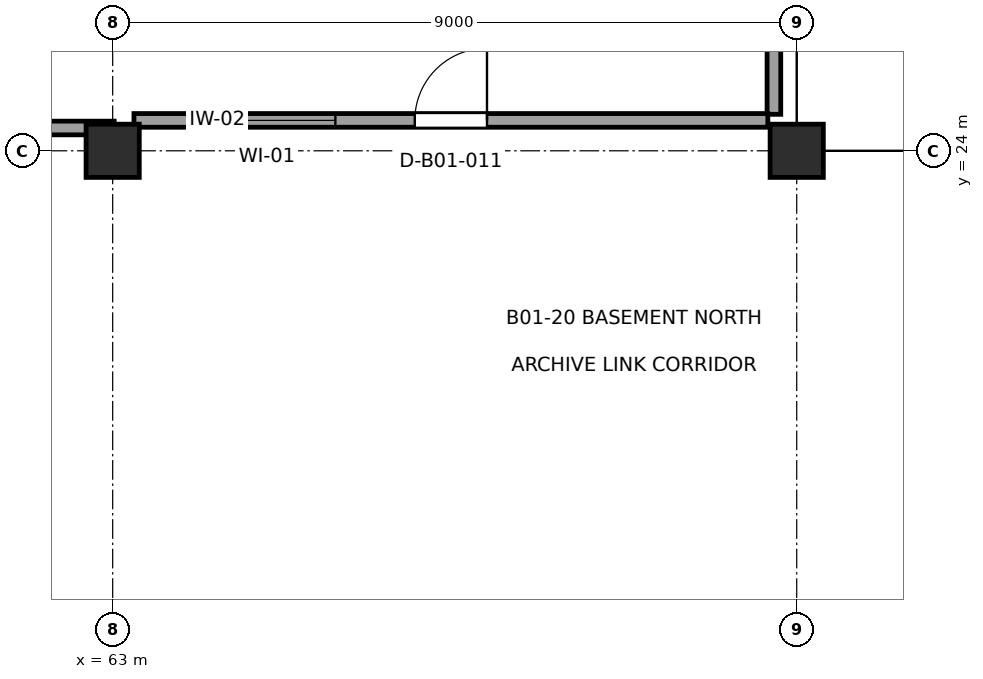
"""IFC4 building model, lengths in metres.
Left out: names, types, materials, properties, quantities, classifications, styles, units other than length and angle.
Written with IfcOpenShell. Run it as: python <this file> out.ifc"""

import sys

from ifc_helpers import new_model, si_unit, direction, frame, frame_2d, origin, origin_2d, place, context, subcontext, project, spatial, rectangle, extrude, element, fill, save


model = new_model("IFC4")
c1 = context("Model", 3, precision=1e-05, world=origin(), true_north=direction((0.0, 1.0)))
c2 = subcontext(c1, "Body", "Model", "MODEL_VIEW")
j1 = project(units=[si_unit("LENGTHUNIT", "METRE"), si_unit("PLANEANGLEUNIT", "RADIAN")], contexts=[c1])
p1 = place(None, origin())
s1 = spatial("IfcSite", under=j1, at=p1, CompositionType="ELEMENT")
p2 = place(p1, origin())
s2 = spatial("IfcBuilding", under=s1, at=p2, CompositionType="ELEMENT")
p3 = place(p2, frame((0.0, 0.0, -4.5)))
s3 = spatial("IfcBuildingStorey", under=s2, at=p3, CompositionType="ELEMENT", Elevation=-4.5)
for number, where, z_axis, x_axis in (
    (1, (63.0, 24.0, 0.0), (0.0, 0.0, 1.0), (1.0, 0.0, 0.0)),
    (2, (72.0, 24.0, 0.0), (0.0, 0.0, 1.0), (1.0, 0.0, 0.0)),
):
    element("IfcColumn", number, at=place(p3, frame(where, z_axis=z_axis, x_axis=x_axis)), inside=s3, PredefinedType="COLUMN", context=c2, shape_type="SweptSolid", body=[
        extrude(rectangle(XDim=0.7, YDim=0.7, at=origin_2d()), origin(), (0.0, 0.0, 1.0), 4.5),
    ])
p4 = place(p3, frame((71.7, 53.42, 0.0), z_axis=(0.0, 0.0, 1.0), x_axis=(0.0, -1.0, 0.0)))
e3 = element("IfcWall", 3, at=p4, inside=s3, PredefinedType="PARTITIONING", context=c2, shape_type="SweptSolid", body=[
    extrude(rectangle(XDim=28.94, YDim=0.18, at=frame_2d((14.47, 0.0))), origin(), (0.0, 0.0, 1.0), 4.14),
])
p5 = place(p3, frame((71.62, 24.4, 0.0), z_axis=(0.0, 0.0, 1.0), x_axis=(-1.0, 0.0, 0.0)))
e4 = element("IfcWall", 4, at=p5, inside=s3, PredefinedType="PARTITIONING", context=c2, shape_type="SweptSolid", body=[
    extrude(rectangle(XDim=8.34, YDim=0.18, at=frame_2d((4.17, 0.0))), origin(), (0.0, 0.0, 1.0), 4.14),
])
p6 = place(p5, frame((3.695, 0.0, 0.0)))
e5 = element("IfcOpeningElement", 5, at=p6, cuts=e4, PredefinedType="OPENING", context=c2, shape_type="SweptSolid", body=[
    extrude(rectangle(XDim=0.95, YDim=2.1, at=frame_2d((0.475, 1.05))), frame((0.0, 0.105, 0.0), z_axis=(0.0, -1.0, 0.0), x_axis=(1.0, 0.0, 0.0)), (0.0, 0.0, 1.0), 0.21),
])
p7 = place(p5, frame((5.69, 0.0, 1.05)))
e6 = element("IfcOpeningElement", 6, at=p7, cuts=e4, PredefinedType="OPENING", context=c2, shape_type="SweptSolid", body=[
    extrude(rectangle(XDim=1.8, YDim=1.1, at=frame_2d((0.9, 0.55))), frame((0.0, 0.105, 0.0), z_axis=(0.0, -1.0, 0.0), x_axis=(1.0, 0.0, 0.0)), (0.0, 0.0, 1.0), 0.21),
])
p8 = place(p3, frame((63.02, 24.3, 0.0), z_axis=(0.0, 0.0, 1.0), x_axis=(-1.0, 0.0, 0.0)))
e7 = element("IfcWall", 7, at=p8, inside=s3, PredefinedType="PARTITIONING", context=c2, shape_type="SweptSolid", body=[
    extrude(rectangle(XDim=9.24, YDim=0.18, at=frame_2d((4.62, 0.0))), origin(), (0.0, 0.0, 1.0), 4.14),
])
p9 = place(p6, frame((0.95, 0.0, 0.0), z_axis=(0.0, 0.0, 1.0), x_axis=(-1.0, 0.0, 0.0)))
e8 = element("IfcDoor", 8, at=p9, inside=s3, OperationType="SINGLE_SWING_LEFT", PredefinedType="DOOR", context=c2, shape_type="SweptSolid", body=[
    extrude(rectangle(XDim=0.95, YDim=2.1, at=frame_2d((0.475, 1.05))), frame((0.0, 0.025, 0.0), z_axis=(0.0, -1.0, 0.0), x_axis=(1.0, 0.0, 0.0)), (0.0, 0.0, 1.0), 0.05),
])
fill(e5, e8)
p10 = place(p7, origin())
e9 = element("IfcWindow", 9, at=p10, inside=s3, PartitioningType="SINGLE_PANEL", PredefinedType="WINDOW", context=c2, shape_type="SweptSolid", body=[
    extrude(rectangle(XDim=1.8, YDim=1.1, at=frame_2d((0.9, 0.55))), frame((0.0, 0.03, 0.0), z_axis=(0.0, -1.0, 0.0), x_axis=(1.0, 0.0, 0.0)), (0.0, 0.0, 1.0), 0.06),
])
fill(e6, e9)
save(model, sys.argv[1])
